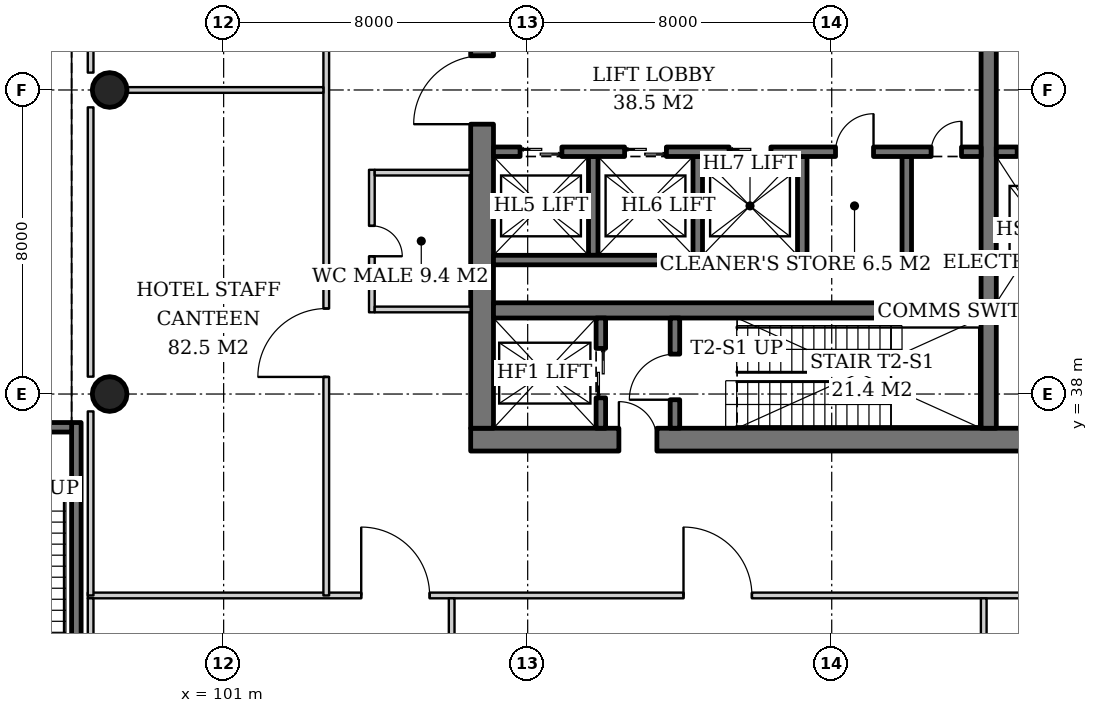
"""IFC4 building model, lengths in metres.
Left out: names, types, materials, properties, quantities, classifications, styles, units other than length and angle.
Written with IfcOpenShell. Run it as: python <this file> out.ifc"""

import sys

from ifc_helpers import new_model, si_unit, direction, frame, frame_2d, origin, origin_2d, place, context, subcontext, project, spatial, rectangle, hollow_circle, extrude, element, fill, save


model = new_model("IFC4")
c1 = context("Model", 3, precision=1e-05, world=origin(), true_north=direction((0.0, 1.0)))
c2 = subcontext(c1, "Body", "Model", "MODEL_VIEW")
j1 = project(units=[si_unit("LENGTHUNIT", "METRE"), si_unit("PLANEANGLEUNIT", "RADIAN")], contexts=[c1])
p1 = place(None, origin())
s1 = spatial("IfcSite", under=j1, at=p1, CompositionType="ELEMENT")
p2 = place(p1, origin())
s2 = spatial("IfcBuilding", under=s1, at=p2, CompositionType="ELEMENT")
p3 = place(p2, frame((0.0, 0.0, -5.0)))
s3 = spatial("IfcBuildingStorey", under=s2, at=p3, CompositionType="ELEMENT", Elevation=-5.0)
for number, where, z_axis, x_axis in (
    (1, (98.0, 46.0, 0.0), (0.0, 0.0, 1.0), (1.0, 0.0, 0.0)),
    (2, (98.0, 38.0, 0.0), (0.0, 0.0, 1.0), (1.0, 0.0, 0.0)),
):
    element("IfcColumn", number, at=place(p3, frame(where, z_axis=z_axis, x_axis=x_axis)), inside=s3, PredefinedType="COLUMN", context=c2, shape_type="SweptSolid", body=[
        extrude(hollow_circle(Radius=0.457, WallThickness=0.03, at=origin_2d()), origin(), (0.0, 0.0, 1.0), 5.0),
    ])
p4 = place(p3, frame((107.5, 36.8, 0.0), z_axis=(0.0, 0.0, 1.0), x_axis=(1.0, 0.0, 0.0)))
e3 = element("IfcWall", 3, at=p4, inside=s3, PredefinedType="SHEAR", context=c2, shape_type="SweptSolid", body=[
    extrude(rectangle(XDim=19.0, YDim=0.6, at=frame_2d((9.5, 0.0))), origin(), (0.0, 0.0, 1.0), 5.0),
])
p5 = place(p4, frame((3.9, 0.0, 0.0)))
e4 = element("IfcOpeningElement", 4, at=p5, cuts=e3, PredefinedType="OPENING", context=c2, shape_type="SweptSolid", body=[
    extrude(rectangle(XDim=1.0, YDim=2.1, at=frame_2d((0.5, 1.05))), frame((0.0, 0.31, 0.0), z_axis=(0.0, -1.0, 0.0), x_axis=(1.0, 0.0, 0.0)), (0.0, 0.0, 1.0), 0.62),
])
p6 = place(p4, frame((14.472, 0.0, 0.0)))
e5 = element("IfcOpeningElement", 5, at=p6, cuts=e3, PredefinedType="OPENING", context=c2, shape_type="SweptSolid", body=[
    extrude(rectangle(XDim=1.0, YDim=2.1, at=frame_2d((0.5, 1.05))), frame((0.0, 0.31, 0.0), z_axis=(0.0, -1.0, 0.0), x_axis=(1.0, 0.0, 0.0)), (0.0, 0.0, 1.0), 0.62),
])
p7 = place(p4, frame((16.365, 0.0, 0.0)))
e6 = element("IfcOpeningElement", 6, at=p7, cuts=e3, PredefinedType="OPENING", context=c2, shape_type="SweptSolid", body=[
    extrude(rectangle(XDim=1.0, YDim=2.1, at=frame_2d((0.5, 1.05))), frame((0.0, 0.31, 0.0), z_axis=(0.0, -1.0, 0.0), x_axis=(1.0, 0.0, 0.0)), (0.0, 0.0, 1.0), 0.62),
])
p8 = place(p3, frame((107.8, 37.1, 0.0), z_axis=(0.0, 0.0, 1.0), x_axis=(0.0, 1.0, 0.0)))
e7 = element("IfcWall", 7, at=p8, inside=s3, PredefinedType="SHEAR", context=c2, shape_type="SweptSolid", body=[
    extrude(rectangle(XDim=17.8, YDim=0.6, at=frame_2d((8.9, 0.0))), origin(), (0.0, 0.0, 1.0), 5.0),
])
p9 = place(p8, frame((8.0, 0.0, 0.0)))
e8 = element("IfcOpeningElement", 8, at=p9, cuts=e7, PredefinedType="OPENING", context=c2, shape_type="SweptSolid", body=[
    extrude(rectangle(XDim=1.8, YDim=2.4, at=frame_2d((0.9, 1.2))), frame((0.0, 0.31, 0.0), z_axis=(0.0, -1.0, 0.0), x_axis=(1.0, 0.0, 0.0)), (0.0, 0.0, 1.0), 0.62),
])
p10 = place(p3, frame((108.1, 40.2, 0.0), z_axis=(0.0, 0.0, 1.0), x_axis=(1.0, 0.0, 0.0)))
e9 = element("IfcWall", 9, at=p10, inside=s3, PredefinedType="SHEAR", context=c2, shape_type="SweptSolid", body=[
    extrude(rectangle(XDim=17.8, YDim=0.4, at=frame_2d((8.9, 0.0))), origin(), (0.0, 0.0, 1.0), 5.0),
])
p11 = place(p3, frame((121.13, 37.1, 0.0), z_axis=(0.0, 0.0, 1.0), x_axis=(0.0, 1.0, 0.0)))
e10 = element("IfcWall", 10, at=p11, inside=s3, PredefinedType="SHEAR", context=c2, shape_type="SweptSolid", body=[
    extrude(rectangle(XDim=2.9, YDim=0.4, at=frame_2d((1.45, 0.0))), origin(), (0.0, 0.0, 1.0), 5.0),
])
p12 = place(p3, frame((121.13, 40.4, 0.0), z_axis=(0.0, 0.0, 1.0), x_axis=(0.0, 1.0, 0.0)))
e11 = element("IfcWall", 11, at=p12, inside=s3, PredefinedType="SHEAR", context=c2, shape_type="SweptSolid", body=[
    extrude(rectangle(XDim=11.2, YDim=0.4, at=frame_2d((5.6, 0.0))), origin(), (0.0, 0.0, 1.0), 5.0),
])
p13 = place(p3, frame((110.925, 37.1, 0.0), z_axis=(0.0, 0.0, 1.0), x_axis=(0.0, 1.0, 0.0)))
e12 = element("IfcWall", 12, at=p13, inside=s3, PredefinedType="SHEAR", context=c2, shape_type="SweptSolid", body=[
    extrude(rectangle(XDim=2.9, YDim=0.25, at=frame_2d((1.45, 0.0))), origin(), (0.0, 0.0, 1.0), 5.0),
])
p14 = place(p13, frame((0.8, 0.0, 0.0)))
e13 = element("IfcOpeningElement", 13, at=p14, cuts=e12, PredefinedType="OPENING", context=c2, shape_type="SweptSolid", body=[
    extrude(rectangle(XDim=1.3, YDim=2.2, at=frame_2d((0.65, 1.1))), frame((0.0, 0.135, 0.0), z_axis=(0.0, -1.0, 0.0), x_axis=(1.0, 0.0, 0.0)), (0.0, 0.0, 1.0), 0.27),
])
p15 = place(p3, frame((112.875, 37.1, 0.0), z_axis=(0.0, 0.0, 1.0), x_axis=(0.0, 1.0, 0.0)))
e14 = element("IfcWall", 14, at=p15, inside=s3, PredefinedType="SHEAR", context=c2, shape_type="SweptSolid", body=[
    extrude(rectangle(XDim=2.9, YDim=0.25, at=frame_2d((1.45, 0.0))), origin(), (0.0, 0.0, 1.0), 5.0),
])
p16 = place(p15, frame((0.75, 0.0, 0.0)))
e15 = element("IfcOpeningElement", 15, at=p16, cuts=e14, PredefinedType="OPENING", context=c2, shape_type="SweptSolid", body=[
    extrude(rectangle(XDim=1.2, YDim=2.1, at=frame_2d((0.6, 1.05))), frame((0.0, 0.135, 0.0), z_axis=(0.0, -1.0, 0.0), x_axis=(1.0, 0.0, 0.0)), (0.0, 0.0, 1.0), 0.27),
])
for number, where, z_axis, x_axis in (
    (16, (110.725, 44.25, 0.0), (0.0, 0.0, 1.0), (0.0, -1.0, 0.0)),
    (17, (113.475, 44.25, 0.0), (0.0, 0.0, 1.0), (0.0, -1.0, 0.0)),
    (18, (116.225, 44.25, 0.0), (0.0, 0.0, 1.0), (0.0, -1.0, 0.0)),
    (19, (118.975, 44.25, 0.0), (0.0, 0.0, 1.0), (0.0, -1.0, 0.0)),
):
    element("IfcWall", number, at=place(p3, frame(where, z_axis=z_axis, x_axis=x_axis)), inside=s3, PredefinedType="SHEAR", context=c2, shape_type="SweptSolid", body=[
        extrude(rectangle(XDim=2.6, YDim=0.25, at=frame_2d((1.3, 0.0))), origin(), (0.0, 0.0, 1.0), 5.0),
    ])
p17 = place(p3, frame((108.1, 41.525, 0.0), z_axis=(0.0, 0.0, 1.0), x_axis=(1.0, 0.0, 0.0)))
e20 = element("IfcWall", 20, at=p17, inside=s3, PredefinedType="SHEAR", context=c2, shape_type="SweptSolid", body=[
    extrude(rectangle(XDim=11.0, YDim=0.25, at=frame_2d((5.5, 0.0))), origin(), (0.0, 0.0, 1.0), 5.0),
])
p18 = place(p3, frame((108.1, 44.375, 0.0), z_axis=(0.0, 0.0, 1.0), x_axis=(1.0, 0.0, 0.0)))
e21 = element("IfcWall", 21, at=p18, inside=s3, PredefinedType="SHEAR", context=c2, shape_type="SweptSolid", body=[
    extrude(rectangle(XDim=12.83, YDim=0.25, at=frame_2d((6.415, 0.0))), origin(), (0.0, 0.0, 1.0), 5.0),
])
p19 = place(p18, frame((0.7, 0.0, 0.0)))
e22 = element("IfcOpeningElement", 22, at=p19, cuts=e21, PredefinedType="OPENING", context=c2, shape_type="SweptSolid", body=[
    extrude(rectangle(XDim=1.1, YDim=2.2, at=frame_2d((0.55, 1.1))), frame((0.0, 0.135, 0.0), z_axis=(0.0, -1.0, 0.0), x_axis=(1.0, 0.0, 0.0)), (0.0, 0.0, 1.0), 0.27),
])
p20 = place(p18, frame((3.45, 0.0, 0.0)))
e23 = element("IfcOpeningElement", 23, at=p20, cuts=e21, PredefinedType="OPENING", context=c2, shape_type="SweptSolid", body=[
    extrude(rectangle(XDim=1.1, YDim=2.2, at=frame_2d((0.55, 1.1))), frame((0.0, 0.135, 0.0), z_axis=(0.0, -1.0, 0.0), x_axis=(1.0, 0.0, 0.0)), (0.0, 0.0, 1.0), 0.27),
])
p21 = place(p18, frame((6.2, 0.0, 0.0)))
e24 = element("IfcOpeningElement", 24, at=p21, cuts=e21, PredefinedType="OPENING", context=c2, shape_type="SweptSolid", body=[
    extrude(rectangle(XDim=1.1, YDim=2.2, at=frame_2d((0.55, 1.1))), frame((0.0, 0.135, 0.0), z_axis=(0.0, -1.0, 0.0), x_axis=(1.0, 0.0, 0.0)), (0.0, 0.0, 1.0), 0.27),
])
p22 = place(p18, frame((9.0, 0.0, 0.0)))
e25 = element("IfcOpeningElement", 25, at=p22, cuts=e21, PredefinedType="OPENING", context=c2, shape_type="SweptSolid", body=[
    extrude(rectangle(XDim=1.0, YDim=2.1, at=frame_2d((0.5, 1.05))), frame((0.0, 0.135, 0.0), z_axis=(0.0, -1.0, 0.0), x_axis=(1.0, 0.0, 0.0)), (0.0, 0.0, 1.0), 0.27),
])
p23 = place(p18, frame((11.515, 0.0, 0.0)))
e26 = element("IfcOpeningElement", 26, at=p23, cuts=e21, PredefinedType="OPENING", context=c2, shape_type="SweptSolid", body=[
    extrude(rectangle(XDim=0.8, YDim=2.0, at=frame_2d((0.4, 1.0))), frame((0.0, 0.135, 0.0), z_axis=(0.0, -1.0, 0.0), x_axis=(1.0, 0.0, 0.0)), (0.0, 0.0, 1.0), 0.27),
])
p24 = place(p3, frame((121.33, 44.375, 0.0), z_axis=(0.0, 0.0, 1.0), x_axis=(1.0, 0.0, 0.0)))
e27 = element("IfcWall", 27, at=p24, inside=s3, PredefinedType="SHEAR", context=c2, shape_type="SweptSolid", body=[
    extrude(rectangle(XDim=4.57, YDim=0.25, at=frame_2d((2.285, 0.0))), origin(), (0.0, 0.0, 1.0), 5.0),
])
p25 = place(p24, frame((0.55, 0.0, 0.0)))
e28 = element("IfcOpeningElement", 28, at=p25, cuts=e27, PredefinedType="OPENING", context=c2, shape_type="SweptSolid", body=[
    extrude(rectangle(XDim=1.4, YDim=2.4, at=frame_2d((0.7, 1.2))), frame((0.0, 0.135, 0.0), z_axis=(0.0, -1.0, 0.0), x_axis=(1.0, 0.0, 0.0)), (0.0, 0.0, 1.0), 0.27),
])
p26 = place(p24, frame((3.26, 0.0, 0.0)))
e29 = element("IfcOpeningElement", 29, at=p26, cuts=e27, PredefinedType="OPENING", context=c2, shape_type="SweptSolid", body=[
    extrude(rectangle(XDim=0.8, YDim=2.0, at=frame_2d((0.4, 1.0))), frame((0.0, 0.135, 0.0), z_axis=(0.0, -1.0, 0.0), x_axis=(1.0, 0.0, 0.0)), (0.0, 0.0, 1.0), 0.27),
])
p27 = place(p3, frame((97.125, 28.75, 0.0), z_axis=(0.0, 0.0, 1.0), x_axis=(0.0, 1.0, 0.0)))
e30 = element("IfcWall", 30, at=p27, inside=s3, PredefinedType="SOLIDWALL", context=c2, shape_type="SweptSolid", body=[
    extrude(rectangle(XDim=8.5, YDim=0.25, at=frame_2d((4.25, 0.0))), origin(), (0.0, 0.0, 1.0), 4.6),
])
p28 = place(p3, frame((94.0, 37.125, 0.0), z_axis=(0.0, 0.0, 1.0), x_axis=(1.0, 0.0, 0.0)))
e31 = element("IfcWall", 31, at=p28, inside=s3, PredefinedType="SOLIDWALL", context=c2, shape_type="SweptSolid", body=[
    extrude(rectangle(XDim=3.0, YDim=0.25, at=frame_2d((1.5, 0.0))), origin(), (0.0, 0.0, 1.0), 4.6),
])
p29 = place(p28, frame((0.9, 0.0, 0.0)))
e32 = element("IfcOpeningElement", 32, at=p29, cuts=e31, PredefinedType="OPENING", context=c2, shape_type="SweptSolid", body=[
    extrude(rectangle(XDim=1.2, YDim=2.1, at=frame_2d((0.6, 1.05))), frame((0.0, 0.135, 0.0), z_axis=(0.0, -1.0, 0.0), x_axis=(1.0, 0.0, 0.0)), (0.0, 0.0, 1.0), 0.27),
])
p30 = place(p3, frame((104.9, 43.9, 0.0), z_axis=(0.0, 0.0, 1.0), x_axis=(0.0, -1.0, 0.0)))
e33 = element("IfcWall", 33, at=p30, inside=s3, PredefinedType="PARTITIONING", context=c2, shape_type="SweptSolid", body=[
    extrude(rectangle(XDim=3.75, YDim=0.15, at=frame_2d((1.875, 0.0))), origin(), (0.0, 0.0, 1.0), 3.947),
])
p31 = place(p30, frame((1.475, 0.0, 0.0)))
e34 = element("IfcOpeningElement", 34, at=p31, cuts=e33, PredefinedType="OPENING", context=c2, shape_type="SweptSolid", body=[
    extrude(rectangle(XDim=0.8, YDim=2.1, at=frame_2d((0.4, 1.05))), frame((0.0, 0.085, 0.0), z_axis=(0.0, -1.0, 0.0), x_axis=(1.0, 0.0, 0.0)), (0.0, 0.0, 1.0), 0.17),
])
for number, where, z_axis, x_axis in (
    (35, (104.975, 43.825, 0.0), (0.0, 0.0, 1.0), (1.0, 0.0, 0.0)),
    (36, (104.975, 40.225, 0.0), (0.0, 0.0, 1.0), (1.0, 0.0, 0.0)),
):
    element("IfcWall", number, at=place(p3, frame(where, z_axis=z_axis, x_axis=x_axis)), inside=s3, PredefinedType="PARTITIONING", context=c2, shape_type="SweptSolid", body=[
        extrude(rectangle(XDim=2.525, YDim=0.15, at=frame_2d((1.262, 0.0))), origin(), (0.0, 0.0, 1.0), 4.7),
    ])
p32 = place(p3, frame((97.425, 32.7, 0.0), z_axis=(0.0, 0.0, 1.0), x_axis=(1.0, 0.0, 0.0)))
e37 = element("IfcWall", 37, at=p32, inside=s3, PredefinedType="PARTITIONING", context=c2, shape_type="SweptSolid", body=[
    extrude(rectangle(XDim=35.15, YDim=0.15, at=frame_2d((17.575, 0.0))), origin(), (0.0, 0.0, 1.0), 3.9),
])
p33 = place(p32, frame((7.195, 0.0, 0.0)))
e38 = element("IfcOpeningElement", 38, at=p33, cuts=e37, PredefinedType="OPENING", context=c2, shape_type="SweptSolid", body=[
    extrude(rectangle(XDim=1.8, YDim=2.4, at=frame_2d((0.9, 1.2))), frame((0.0, 0.085, 0.0), z_axis=(0.0, -1.0, 0.0), x_axis=(1.0, 0.0, 0.0)), (0.0, 0.0, 1.0), 0.17),
])
p34 = place(p32, frame((15.675, 0.0, 0.0)))
e39 = element("IfcOpeningElement", 39, at=p34, cuts=e37, PredefinedType="OPENING", context=c2, shape_type="SweptSolid", body=[
    extrude(rectangle(XDim=1.8, YDim=2.4, at=frame_2d((0.9, 1.2))), frame((0.0, 0.085, 0.0), z_axis=(0.0, -1.0, 0.0), x_axis=(1.0, 0.0, 0.0)), (0.0, 0.0, 1.0), 0.17),
])
p35 = place(p32, frame((28.425, 0.0, 0.0)))
e40 = element("IfcOpeningElement", 40, at=p35, cuts=e37, PredefinedType="OPENING", context=c2, shape_type="SweptSolid", body=[
    extrude(rectangle(XDim=1.8, YDim=2.4, at=frame_2d((0.9, 1.2))), frame((0.0, 0.085, 0.0), z_axis=(0.0, -1.0, 0.0), x_axis=(1.0, 0.0, 0.0)), (0.0, 0.0, 1.0), 0.17),
])
p36 = place(p3, frame((97.5, 30.457, 0.0), z_axis=(0.0, 0.0, 1.0), x_axis=(0.0, 1.0, 0.0)))
e41 = element("IfcWall", 41, at=p36, inside=s3, PredefinedType="PARTITIONING", context=c2, shape_type="SweptSolid", body=[
    extrude(rectangle(XDim=2.168, YDim=0.15, at=frame_2d((1.084, 0.0))), origin(), (0.0, 0.0, 1.0), 4.7),
])
for number, where, z_axis, x_axis in (
    (42, (107.0, 12.475, 0.0), (0.0, 0.0, 1.0), (0.0, 1.0, 0.0)),
    (43, (121.0, 12.475, 0.0), (0.0, 0.0, 1.0), (0.0, 1.0, 0.0)),
):
    element("IfcWall", number, at=place(p3, frame(where, z_axis=z_axis, x_axis=x_axis)), inside=s3, PredefinedType="PARTITIONING", context=c2, shape_type="SweptSolid", body=[
        extrude(rectangle(XDim=20.15, YDim=0.15, at=frame_2d((10.075, 0.0))), origin(), (0.0, 0.0, 1.0), 4.15),
    ])
p37 = place(p3, frame((97.5, 32.7, 0.0), z_axis=(0.0, 0.0, 1.0), x_axis=(0.0, 1.0, 0.0)))
e44 = element("IfcWall", 44, at=p37, inside=s3, PredefinedType="PARTITIONING", context=c2, shape_type="SweptSolid", body=[
    extrude(rectangle(XDim=4.843, YDim=0.15, at=frame_2d((2.421, 0.0))), origin(), (0.0, 0.0, 1.0), 4.7),
])
for number, where, z_axis, x_axis in (
    (45, (97.5, 38.457, 0.0), (0.0, 0.0, 1.0), (0.0, 1.0, 0.0)),
    (46, (97.5, 46.457, 0.0), (0.0, 0.0, 1.0), (0.0, 1.0, 0.0)),
):
    element("IfcWall", number, at=place(p3, frame(where, z_axis=z_axis, x_axis=x_axis)), inside=s3, PredefinedType="PARTITIONING", context=c2, shape_type="SweptSolid", body=[
        extrude(rectangle(XDim=7.086, YDim=0.15, at=frame_2d((3.543, 0.0))), origin(), (0.0, 0.0, 1.0), 4.7),
    ])
p38 = place(p3, frame((103.7, 32.7, 0.0), z_axis=(0.0, 0.0, 1.0), x_axis=(0.0, 1.0, 0.0)))
e47 = element("IfcWall", 47, at=p38, inside=s3, PredefinedType="PARTITIONING", context=c2, shape_type="SweptSolid", body=[
    extrude(rectangle(XDim=26.6, YDim=0.15, at=frame_2d((13.3, 0.0))), origin(), (0.0, 0.0, 1.0), 3.9),
])
p39 = place(p38, frame((5.75, 0.0, 0.0)))
e48 = element("IfcOpeningElement", 48, at=p39, cuts=e47, PredefinedType="OPENING", context=c2, shape_type="SweptSolid", body=[
    extrude(rectangle(XDim=1.8, YDim=2.4, at=frame_2d((0.9, 1.2))), frame((0.0, 0.085, 0.0), z_axis=(0.0, -1.0, 0.0), x_axis=(1.0, 0.0, 0.0)), (0.0, 0.0, 1.0), 0.17),
])
p40 = place(p38, frame((19.05, 0.0, 0.0)))
e49 = element("IfcOpeningElement", 49, at=p40, cuts=e47, PredefinedType="OPENING", context=c2, shape_type="SweptSolid", body=[
    extrude(rectangle(XDim=1.8, YDim=2.4, at=frame_2d((0.9, 1.2))), frame((0.0, 0.085, 0.0), z_axis=(0.0, -1.0, 0.0), x_axis=(1.0, 0.0, 0.0)), (0.0, 0.0, 1.0), 0.17),
])
p41 = place(p3, frame((98.457, 46.0, 0.0), z_axis=(0.0, 0.0, 1.0), x_axis=(1.0, 0.0, 0.0)))
e50 = element("IfcWall", 50, at=p41, inside=s3, PredefinedType="PARTITIONING", context=c2, shape_type="SweptSolid", body=[
    extrude(rectangle(XDim=5.168, YDim=0.15, at=frame_2d((2.584, 0.0))), origin(), (0.0, 0.0, 1.0), 4.7),
])
p42 = place(p14, origin())
e51 = element("IfcDoor", 51, at=p42, inside=s3, OperationType="DOUBLE_DOOR_SLIDING", PredefinedType="DOOR", context=c2, shape_type="SweptSolid", body=[
    extrude(rectangle(XDim=1.3, YDim=2.2, at=frame_2d((0.65, 1.1))), frame((0.0, 0.025, 0.0), z_axis=(0.0, -1.0, 0.0), x_axis=(1.0, 0.0, 0.0)), (0.0, 0.0, 1.0), 0.05),
])
fill(e13, e51)
p43 = place(p16, origin())
e52 = element("IfcDoor", 52, at=p43, inside=s3, OperationType="SINGLE_SWING_LEFT", PredefinedType="DOOR", context=c2, shape_type="SweptSolid", body=[
    extrude(rectangle(XDim=1.2, YDim=2.1, at=frame_2d((0.6, 1.05))), frame((0.0, 0.025, 0.0), z_axis=(0.0, -1.0, 0.0), x_axis=(1.0, 0.0, 0.0)), (0.0, 0.0, 1.0), 0.05),
])
fill(e15, e52)
p44 = place(p19, origin())
e53 = element("IfcDoor", 53, at=p44, inside=s3, OperationType="DOUBLE_DOOR_SLIDING", PredefinedType="DOOR", context=c2, shape_type="SweptSolid", body=[
    extrude(rectangle(XDim=1.1, YDim=2.2, at=frame_2d((0.55, 1.1))), frame((0.0, 0.025, 0.0), z_axis=(0.0, -1.0, 0.0), x_axis=(1.0, 0.0, 0.0)), (0.0, 0.0, 1.0), 0.05),
])
fill(e22, e53)
p45 = place(p20, origin())
e54 = element("IfcDoor", 54, at=p45, inside=s3, OperationType="DOUBLE_DOOR_SLIDING", PredefinedType="DOOR", context=c2, shape_type="SweptSolid", body=[
    extrude(rectangle(XDim=1.1, YDim=2.2, at=frame_2d((0.55, 1.1))), frame((0.0, 0.025, 0.0), z_axis=(0.0, -1.0, 0.0), x_axis=(1.0, 0.0, 0.0)), (0.0, 0.0, 1.0), 0.05),
])
fill(e23, e54)
p46 = place(p21, origin())
e55 = element("IfcDoor", 55, at=p46, inside=s3, OperationType="DOUBLE_DOOR_SLIDING", PredefinedType="DOOR", context=c2, shape_type="SweptSolid", body=[
    extrude(rectangle(XDim=1.1, YDim=2.2, at=frame_2d((0.55, 1.1))), frame((0.0, 0.025, 0.0), z_axis=(0.0, -1.0, 0.0), x_axis=(1.0, 0.0, 0.0)), (0.0, 0.0, 1.0), 0.05),
])
fill(e24, e55)
p47 = place(p22, origin())
e56 = element("IfcDoor", 56, at=p47, inside=s3, OperationType="SINGLE_SWING_RIGHT", PredefinedType="DOOR", context=c2, shape_type="SweptSolid", body=[
    extrude(rectangle(XDim=1.0, YDim=2.1, at=frame_2d((0.5, 1.05))), frame((0.0, 0.025, 0.0), z_axis=(0.0, -1.0, 0.0), x_axis=(1.0, 0.0, 0.0)), (0.0, 0.0, 1.0), 0.05),
])
fill(e25, e56)
p48 = place(p23, origin())
e57 = element("IfcDoor", 57, at=p48, inside=s3, OperationType="SINGLE_SWING_RIGHT", PredefinedType="DOOR", context=c2, shape_type="SweptSolid", body=[
    extrude(rectangle(XDim=0.8, YDim=2.0, at=frame_2d((0.4, 1.0))), frame((0.0, 0.025, 0.0), z_axis=(0.0, -1.0, 0.0), x_axis=(1.0, 0.0, 0.0)), (0.0, 0.0, 1.0), 0.05),
])
fill(e26, e57)
p49 = place(p25, origin())
e58 = element("IfcDoor", 58, at=p49, inside=s3, OperationType="DOUBLE_DOOR_SLIDING", PredefinedType="DOOR", context=c2, shape_type="SweptSolid", body=[
    extrude(rectangle(XDim=1.4, YDim=2.4, at=frame_2d((0.7, 1.2))), frame((0.0, 0.025, 0.0), z_axis=(0.0, -1.0, 0.0), x_axis=(1.0, 0.0, 0.0)), (0.0, 0.0, 1.0), 0.05),
])
fill(e28, e58)
p50 = place(p5, origin())
e59 = element("IfcDoor", 59, at=p50, inside=s3, OperationType="SINGLE_SWING_LEFT", PredefinedType="DOOR", context=c2, shape_type="SweptSolid", body=[
    extrude(rectangle(XDim=1.0, YDim=2.1, at=frame_2d((0.5, 1.05))), frame((0.0, 0.025, 0.0), z_axis=(0.0, -1.0, 0.0), x_axis=(1.0, 0.0, 0.0)), (0.0, 0.0, 1.0), 0.05),
])
fill(e4, e59)
p51 = place(p9, origin())
e60 = element("IfcDoor", 60, at=p51, inside=s3, OperationType="DOUBLE_DOOR_SINGLE_SWING", PredefinedType="DOOR", context=c2, shape_type="SweptSolid", body=[
    extrude(rectangle(XDim=1.8, YDim=2.4, at=frame_2d((0.9, 1.2))), frame((0.0, 0.025, 0.0), z_axis=(0.0, -1.0, 0.0), x_axis=(1.0, 0.0, 0.0)), (0.0, 0.0, 1.0), 0.05),
])
fill(e8, e60)
p52 = place(p31, origin())
e61 = element("IfcDoor", 61, at=p52, inside=s3, OperationType="SINGLE_SWING_RIGHT", PredefinedType="DOOR", context=c2, shape_type="SweptSolid", body=[
    extrude(rectangle(XDim=0.8, YDim=2.1, at=frame_2d((0.4, 1.05))), frame((0.0, 0.025, 0.0), z_axis=(0.0, -1.0, 0.0), x_axis=(1.0, 0.0, 0.0)), (0.0, 0.0, 1.0), 0.05),
])
fill(e34, e61)
p53 = place(p33, origin())
e62 = element("IfcDoor", 62, at=p53, inside=s3, OperationType="DOUBLE_DOOR_SINGLE_SWING", PredefinedType="DOOR", context=c2, shape_type="SweptSolid", body=[
    extrude(rectangle(XDim=1.8, YDim=2.4, at=frame_2d((0.9, 1.2))), frame((0.0, 0.025, 0.0), z_axis=(0.0, -1.0, 0.0), x_axis=(1.0, 0.0, 0.0)), (0.0, 0.0, 1.0), 0.05),
])
fill(e38, e62)
p54 = place(p34, origin())
e63 = element("IfcDoor", 63, at=p54, inside=s3, OperationType="DOUBLE_DOOR_SINGLE_SWING", PredefinedType="DOOR", context=c2, shape_type="SweptSolid", body=[
    extrude(rectangle(XDim=1.8, YDim=2.4, at=frame_2d((0.9, 1.2))), frame((0.0, 0.025, 0.0), z_axis=(0.0, -1.0, 0.0), x_axis=(1.0, 0.0, 0.0)), (0.0, 0.0, 1.0), 0.05),
])
fill(e39, e63)
p55 = place(p39, origin())
e64 = element("IfcDoor", 64, at=p55, inside=s3, OperationType="DOUBLE_DOOR_SINGLE_SWING", PredefinedType="DOOR", context=c2, shape_type="SweptSolid", body=[
    extrude(rectangle(XDim=1.8, YDim=2.4, at=frame_2d((0.9, 1.2))), frame((0.0, 0.025, 0.0), z_axis=(0.0, -1.0, 0.0), x_axis=(1.0, 0.0, 0.0)), (0.0, 0.0, 1.0), 0.05),
])
fill(e48, e64)
save(model, sys.argv[1])
